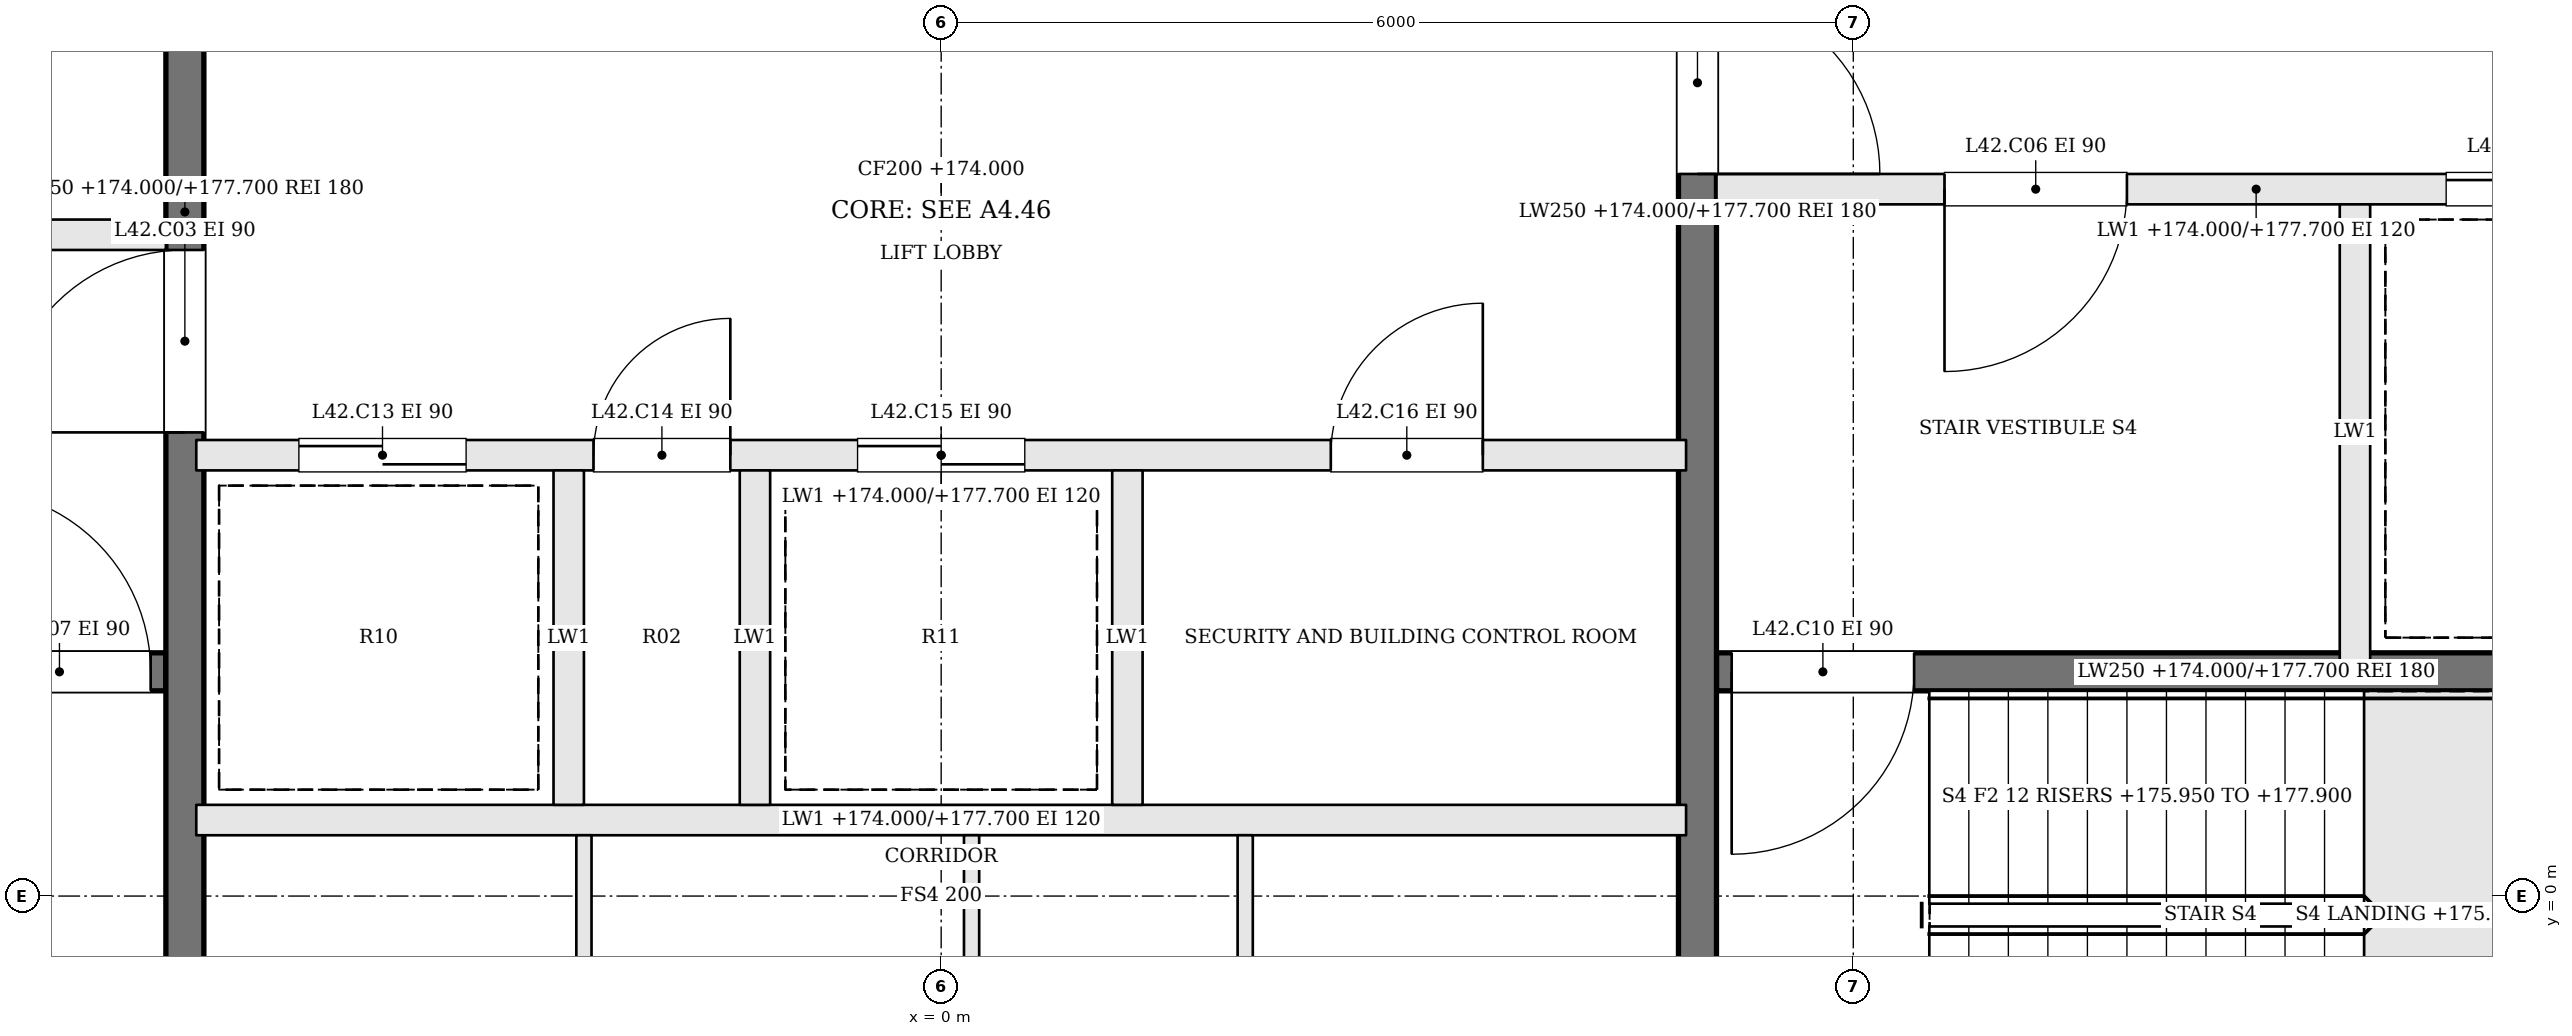
"""IFC4 building model, lengths in metres.
Left out: names, types, materials, properties, quantities, classifications, styles, units other than length and angle.
Written with IfcOpenShell. Run it as: python <this file> out.ifc"""

import sys

from ifc_helpers import new_model, si_unit, direction, frame, frame_2d, origin, place, context, subcontext, project, spatial, rectangle, extrude, element, fill, save


model = new_model("IFC4")
c1 = context("Model", 3, precision=1e-05, world=origin(), true_north=direction((0.0, 1.0)))
c2 = subcontext(c1, "Body", "Model", "MODEL_VIEW")
j1 = project(units=[si_unit("LENGTHUNIT", "METRE"), si_unit("PLANEANGLEUNIT", "RADIAN")], contexts=[c1])
p1 = place(None, origin())
s1 = spatial("IfcSite", under=j1, at=p1, CompositionType="ELEMENT")
p2 = place(p1, origin())
s2 = spatial("IfcBuilding", under=s1, at=p2, CompositionType="ELEMENT")
p3 = place(p2, frame((0.0, 0.0, 174.0)))
s3 = spatial("IfcBuildingStorey", under=s2, at=p3, CompositionType="ELEMENT", Elevation=174.0)
p4 = place(p3, frame((-12.2, 1.475, 0.0), z_axis=(0.0, 0.0, 1.0), x_axis=(1.0, 0.0, 0.0)))
e1 = element("IfcWall", 1, at=p4, inside=s3, PredefinedType="SOLIDWALL", context=c2, shape_type="SweptSolid", body=[
    extrude(rectangle(XDim=7.1, YDim=0.25, at=frame_2d((3.55, 0.0))), origin(), (0.0, 0.0, 1.0), 3.7),
])
p5 = place(p4, frame((5.8, 0.0, 0.0)))
e2 = element("IfcOpeningElement", 2, at=p5, cuts=e1, PredefinedType="OPENING", context=c2, shape_type="SweptSolid", body=[
    extrude(rectangle(XDim=1.2, YDim=2.1, at=frame_2d((0.6, 1.05))), frame((0.0, 0.135, 0.0), z_axis=(0.0, -1.0, 0.0), x_axis=(1.0, 0.0, 0.0)), (0.0, 0.0, 1.0), 0.27),
])
p6 = place(p3, frame((-12.2, 4.35, 0.0), z_axis=(0.0, 0.0, 1.0), x_axis=(1.0, 0.0, 0.0)))
e3 = element("IfcWall", 3, at=p6, inside=s3, PredefinedType="SOLIDWALL", context=c2, shape_type="SweptSolid", body=[
    extrude(rectangle(XDim=7.1, YDim=0.2, at=frame_2d((3.55, 0.0))), origin(), (0.0, 0.0, 1.0), 3.7),
])
p7 = place(p6, frame((4.4, 0.0, 0.0)))
e4 = element("IfcOpeningElement", 4, at=p7, cuts=e3, PredefinedType="OPENING", context=c2, shape_type="SweptSolid", body=[
    extrude(rectangle(XDim=1.2, YDim=2.1, at=frame_2d((0.6, 1.05))), frame((0.0, 0.11, 0.0), z_axis=(0.0, -1.0, 0.0), x_axis=(1.0, 0.0, 0.0)), (0.0, 0.0, 1.0), 0.22),
])
p8 = place(p6, frame((1.1, 0.0, 0.0)))
e5 = element("IfcOpeningElement", 5, at=p8, cuts=e3, PredefinedType="OPENING", context=c2, shape_type="SweptSolid", body=[
    extrude(rectangle(XDim=1.2, YDim=2.1, at=frame_2d((0.6, 1.05))), frame((0.0, 0.11, 0.0), z_axis=(0.0, -1.0, 0.0), x_axis=(1.0, 0.0, 0.0)), (0.0, 0.0, 1.0), 0.22),
])
p9 = place(p3, frame((12.2, 4.65, 0.0), z_axis=(0.0, 0.0, 1.0), x_axis=(-1.0, 0.0, 0.0)))
e6 = element("IfcWall", 6, at=p9, inside=s3, PredefinedType="SOLIDWALL", context=c2, shape_type="SweptSolid", body=[
    extrude(rectangle(XDim=7.1, YDim=0.2, at=frame_2d((3.55, 0.0))), origin(), (0.0, 0.0, 1.0), 3.7),
])
p10 = place(p9, frame((4.4, 0.0, 0.0)))
e7 = element("IfcOpeningElement", 7, at=p10, cuts=e6, PredefinedType="OPENING", context=c2, shape_type="SweptSolid", body=[
    extrude(rectangle(XDim=1.2, YDim=2.1, at=frame_2d((0.6, 1.05))), frame((0.0, 0.11, 0.0), z_axis=(0.0, -1.0, 0.0), x_axis=(1.0, 0.0, 0.0)), (0.0, 0.0, 1.0), 0.22),
])
p11 = place(p9, frame((1.1, 0.0, 0.0)))
e8 = element("IfcOpeningElement", 8, at=p11, cuts=e6, PredefinedType="OPENING", context=c2, shape_type="SweptSolid", body=[
    extrude(rectangle(XDim=1.2, YDim=2.1, at=frame_2d((0.6, 1.05))), frame((0.0, 0.11, 0.0), z_axis=(0.0, -1.0, 0.0), x_axis=(1.0, 0.0, 0.0)), (0.0, 0.0, 1.0), 0.22),
])
p12 = place(p3, frame((12.2, 1.475, 0.0), z_axis=(0.0, 0.0, 1.0), x_axis=(-1.0, 0.0, 0.0)))
e9 = element("IfcWall", 9, at=p12, inside=s3, PredefinedType="SOLIDWALL", context=c2, shape_type="SweptSolid", body=[
    extrude(rectangle(XDim=7.1, YDim=0.25, at=frame_2d((3.55, 0.0))), origin(), (0.0, 0.0, 1.0), 3.7),
])
p13 = place(p12, frame((5.8, 0.0, 0.0)))
e10 = element("IfcOpeningElement", 10, at=p13, cuts=e9, PredefinedType="OPENING", context=c2, shape_type="SweptSolid", body=[
    extrude(rectangle(XDim=1.2, YDim=2.1, at=frame_2d((0.6, 1.05))), frame((0.0, 0.135, 0.0), z_axis=(0.0, -1.0, 0.0), x_axis=(1.0, 0.0, 0.0)), (0.0, 0.0, 1.0), 0.27),
])
p14 = place(p3, frame((9.3, 4.55, 0.0), z_axis=(0.0, 0.0, 1.0), x_axis=(0.0, -1.0, 0.0)))
e11 = element("IfcWall", 11, at=p14, inside=s3, PredefinedType="SOLIDWALL", context=c2, shape_type="SweptSolid", body=[
    extrude(rectangle(XDim=3.0, YDim=0.2, at=frame_2d((1.5, 0.0))), origin(), (0.0, 0.0, 1.0), 3.7),
])
p15 = place(p3, frame((-4.975, -2.2, 0.0), z_axis=(0.0, 0.0, 1.0), x_axis=(0.0, 1.0, 0.0)))
e12 = element("IfcWall", 12, at=p15, inside=s3, PredefinedType="SOLIDWALL", context=c2, shape_type="SweptSolid", body=[
    extrude(rectangle(XDim=13.4, YDim=0.25, at=frame_2d((6.7, 0.0))), origin(), (0.0, 0.0, 1.0), 3.7),
])
p16 = place(p15, frame((5.25, 0.0, 0.0)))
e13 = element("IfcOpeningElement", 13, at=p16, cuts=e12, PredefinedType="OPENING", context=c2, shape_type="SweptSolid", body=[
    extrude(rectangle(XDim=1.2, YDim=2.1, at=frame_2d((0.6, 1.05))), frame((0.0, 0.135, 0.0), z_axis=(0.0, -1.0, 0.0), x_axis=(1.0, 0.0, 0.0)), (0.0, 0.0, 1.0), 0.27),
])
p17 = place(p3, frame((4.975, 11.2, 0.0), z_axis=(0.0, 0.0, 1.0), x_axis=(0.0, -1.0, 0.0)))
e14 = element("IfcWall", 14, at=p17, inside=s3, PredefinedType="SOLIDWALL", context=c2, shape_type="SweptSolid", body=[
    extrude(rectangle(XDim=13.4, YDim=0.25, at=frame_2d((6.7, 0.0))), origin(), (0.0, 0.0, 1.0), 3.7),
])
p18 = place(p17, frame((5.25, 0.0, 0.0)))
e15 = element("IfcOpeningElement", 15, at=p18, cuts=e14, PredefinedType="OPENING", context=c2, shape_type="SweptSolid", body=[
    extrude(rectangle(XDim=1.2, YDim=2.1, at=frame_2d((0.6, 1.05))), frame((0.0, 0.135, 0.0), z_axis=(0.0, -1.0, 0.0), x_axis=(1.0, 0.0, 0.0)), (0.0, 0.0, 1.0), 0.27),
])
p19 = place(p3, frame((-4.9, 0.5, 0.0), z_axis=(0.0, 0.0, 1.0), x_axis=(1.0, 0.0, 0.0)))
e16 = element("IfcWall", 16, at=p19, inside=s3, PredefinedType="SOLIDWALL", context=c2, shape_type="SweptSolid", body=[
    extrude(rectangle(XDim=9.8, YDim=0.2, at=frame_2d((4.9, 0.0))), origin(), (0.0, 0.0, 1.0), 3.7),
])
p20 = place(p3, frame((-4.9, 2.9, 0.0), z_axis=(0.0, 0.0, 1.0), x_axis=(1.0, 0.0, 0.0)))
e17 = element("IfcWall", 17, at=p20, inside=s3, PredefinedType="SOLIDWALL", context=c2, shape_type="SweptSolid", body=[
    extrude(rectangle(XDim=9.8, YDim=0.2, at=frame_2d((4.9, 0.0))), origin(), (0.0, 0.0, 1.0), 3.7),
])
p21 = place(p20, frame((0.675, 0.0, 0.0)))
e18 = element("IfcOpeningElement", 18, at=p21, cuts=e17, PredefinedType="OPENING", context=c2, shape_type="SweptSolid", body=[
    extrude(rectangle(XDim=1.1, YDim=2.1, at=frame_2d((0.55, 1.05))), frame((0.0, 0.11, 0.0), z_axis=(0.0, -1.0, 0.0), x_axis=(1.0, 0.0, 0.0)), (0.0, 0.0, 1.0), 0.22),
])
p22 = place(p20, frame((2.613, 0.0, 0.0)))
e19 = element("IfcOpeningElement", 19, at=p22, cuts=e17, PredefinedType="OPENING", context=c2, shape_type="SweptSolid", body=[
    extrude(rectangle(XDim=0.9, YDim=2.1, at=frame_2d((0.45, 1.05))), frame((0.0, 0.11, 0.0), z_axis=(0.0, -1.0, 0.0), x_axis=(1.0, 0.0, 0.0)), (0.0, 0.0, 1.0), 0.22),
])
p23 = place(p20, frame((4.35, 0.0, 0.0)))
e20 = element("IfcOpeningElement", 20, at=p23, cuts=e17, PredefinedType="OPENING", context=c2, shape_type="SweptSolid", body=[
    extrude(rectangle(XDim=1.1, YDim=2.1, at=frame_2d((0.55, 1.05))), frame((0.0, 0.11, 0.0), z_axis=(0.0, -1.0, 0.0), x_axis=(1.0, 0.0, 0.0)), (0.0, 0.0, 1.0), 0.22),
])
p24 = place(p20, frame((7.463, 0.0, 0.0)))
e21 = element("IfcOpeningElement", 21, at=p24, cuts=e17, PredefinedType="OPENING", context=c2, shape_type="SweptSolid", body=[
    extrude(rectangle(XDim=1.0, YDim=2.1, at=frame_2d((0.5, 1.05))), frame((0.0, 0.11, 0.0), z_axis=(0.0, -1.0, 0.0), x_axis=(1.0, 0.0, 0.0)), (0.0, 0.0, 1.0), 0.22),
])
for number, where, z_axis, x_axis in (
    (22, (-2.45, 0.6, 0.0), (0.0, 0.0, 1.0), (0.0, 1.0, 0.0)),
    (23, (-1.225, 0.6, 0.0), (0.0, 0.0, 1.0), (0.0, 1.0, 0.0)),
    (24, (1.225, 0.6, 0.0), (0.0, 0.0, 1.0), (0.0, 1.0, 0.0)),
):
    element("IfcWall", number, at=place(p3, frame(where, z_axis=z_axis, x_axis=x_axis)), inside=s3, PredefinedType="SOLIDWALL", context=c2, shape_type="SweptSolid", body=[
        extrude(rectangle(XDim=2.2, YDim=0.2, at=frame_2d((1.1, 0.0))), origin(), (0.0, 0.0, 1.0), 3.7),
    ])
for number, where, z_axis, x_axis in (
    (25, (-2.35, -2.2, 0.0), (0.0, 0.0, 1.0), (0.0, 1.0, 0.0)),
    (26, (0.2, -2.2, 0.0), (0.0, 0.0, 1.0), (0.0, 1.0, 0.0)),
    (27, (2.0, -2.2, 0.0), (0.0, 0.0, 1.0), (0.0, 1.0, 0.0)),
):
    element("IfcWall", number, at=place(p3, frame(where, z_axis=z_axis, x_axis=x_axis)), inside=s3, PredefinedType="PARTITIONING", context=c2, shape_type="SweptSolid", body=[
        extrude(rectangle(XDim=2.6, YDim=0.1, at=frame_2d((1.3, 0.0))), origin(), (0.0, 0.0, 1.0), 3.7),
    ])
p25 = place(p16, origin())
e28 = element("IfcDoor", 28, at=p25, inside=s3, OperationType="SINGLE_SWING_LEFT", PredefinedType="DOOR", context=c2, shape_type="SweptSolid", body=[
    extrude(rectangle(XDim=1.2, YDim=2.1, at=frame_2d((0.6, 1.05))), frame((0.0, 0.025, 0.0), z_axis=(0.0, -1.0, 0.0), x_axis=(1.0, 0.0, 0.0)), (0.0, 0.0, 1.0), 0.05),
])
fill(e13, e28)
p26 = place(p18, origin())
e29 = element("IfcDoor", 29, at=p26, inside=s3, OperationType="SINGLE_SWING_RIGHT", PredefinedType="DOOR", context=c2, shape_type="SweptSolid", body=[
    extrude(rectangle(XDim=1.2, YDim=2.1, at=frame_2d((0.6, 1.05))), frame((0.0, 0.025, 0.0), z_axis=(0.0, -1.0, 0.0), x_axis=(1.0, 0.0, 0.0)), (0.0, 0.0, 1.0), 0.05),
])
fill(e15, e29)
p27 = place(p10, origin())
e30 = element("IfcDoor", 30, at=p27, inside=s3, OperationType="SINGLE_SWING_RIGHT", PredefinedType="DOOR", context=c2, shape_type="SweptSolid", body=[
    extrude(rectangle(XDim=1.2, YDim=2.1, at=frame_2d((0.6, 1.05))), frame((0.0, 0.025, 0.0), z_axis=(0.0, -1.0, 0.0), x_axis=(1.0, 0.0, 0.0)), (0.0, 0.0, 1.0), 0.05),
])
fill(e7, e30)
p28 = place(p5, origin())
e31 = element("IfcDoor", 31, at=p28, inside=s3, OperationType="SINGLE_SWING_LEFT", PredefinedType="DOOR", context=c2, shape_type="SweptSolid", body=[
    extrude(rectangle(XDim=1.2, YDim=2.1, at=frame_2d((0.6, 1.05))), frame((0.0, 0.025, 0.0), z_axis=(0.0, -1.0, 0.0), x_axis=(1.0, 0.0, 0.0)), (0.0, 0.0, 1.0), 0.05),
])
fill(e2, e31)
p29 = place(p13, origin())
e32 = element("IfcDoor", 32, at=p29, inside=s3, OperationType="SINGLE_SWING_RIGHT", PredefinedType="DOOR", context=c2, shape_type="SweptSolid", body=[
    extrude(rectangle(XDim=1.2, YDim=2.1, at=frame_2d((0.6, 1.05))), frame((0.0, 0.025, 0.0), z_axis=(0.0, -1.0, 0.0), x_axis=(1.0, 0.0, 0.0)), (0.0, 0.0, 1.0), 0.05),
])
fill(e10, e32)
p30 = place(p11, origin())
e33 = element("IfcDoor", 33, at=p30, inside=s3, OperationType="SLIDING_TO_RIGHT", PredefinedType="DOOR", context=c2, shape_type="SweptSolid", body=[
    extrude(rectangle(XDim=1.2, YDim=2.1, at=frame_2d((0.6, 1.05))), frame((0.0, 0.025, 0.0), z_axis=(0.0, -1.0, 0.0), x_axis=(1.0, 0.0, 0.0)), (0.0, 0.0, 1.0), 0.05),
])
fill(e8, e33)
p31 = place(p21, origin())
e34 = element("IfcDoor", 34, at=p31, inside=s3, OperationType="SLIDING_TO_RIGHT", PredefinedType="DOOR", context=c2, shape_type="SweptSolid", body=[
    extrude(rectangle(XDim=1.1, YDim=2.1, at=frame_2d((0.55, 1.05))), frame((0.0, 0.025, 0.0), z_axis=(0.0, -1.0, 0.0), x_axis=(1.0, 0.0, 0.0)), (0.0, 0.0, 1.0), 0.05),
])
fill(e18, e34)
p32 = place(p22, origin())
e35 = element("IfcDoor", 35, at=p32, inside=s3, OperationType="SINGLE_SWING_RIGHT", PredefinedType="DOOR", context=c2, shape_type="SweptSolid", body=[
    extrude(rectangle(XDim=0.9, YDim=2.1, at=frame_2d((0.45, 1.05))), frame((0.0, 0.025, 0.0), z_axis=(0.0, -1.0, 0.0), x_axis=(1.0, 0.0, 0.0)), (0.0, 0.0, 1.0), 0.05),
])
fill(e19, e35)
p33 = place(p23, origin())
e36 = element("IfcDoor", 36, at=p33, inside=s3, OperationType="SLIDING_TO_LEFT", PredefinedType="DOOR", context=c2, shape_type="SweptSolid", body=[
    extrude(rectangle(XDim=1.1, YDim=2.1, at=frame_2d((0.55, 1.05))), frame((0.0, 0.025, 0.0), z_axis=(0.0, -1.0, 0.0), x_axis=(1.0, 0.0, 0.0)), (0.0, 0.0, 1.0), 0.05),
])
fill(e20, e36)
p34 = place(p24, origin())
e37 = element("IfcDoor", 37, at=p34, inside=s3, OperationType="SINGLE_SWING_RIGHT", PredefinedType="DOOR", context=c2, shape_type="SweptSolid", body=[
    extrude(rectangle(XDim=1.0, YDim=2.1, at=frame_2d((0.5, 1.05))), frame((0.0, 0.025, 0.0), z_axis=(0.0, -1.0, 0.0), x_axis=(1.0, 0.0, 0.0)), (0.0, 0.0, 1.0), 0.05),
])
fill(e21, e37)
save(model, sys.argv[1])
